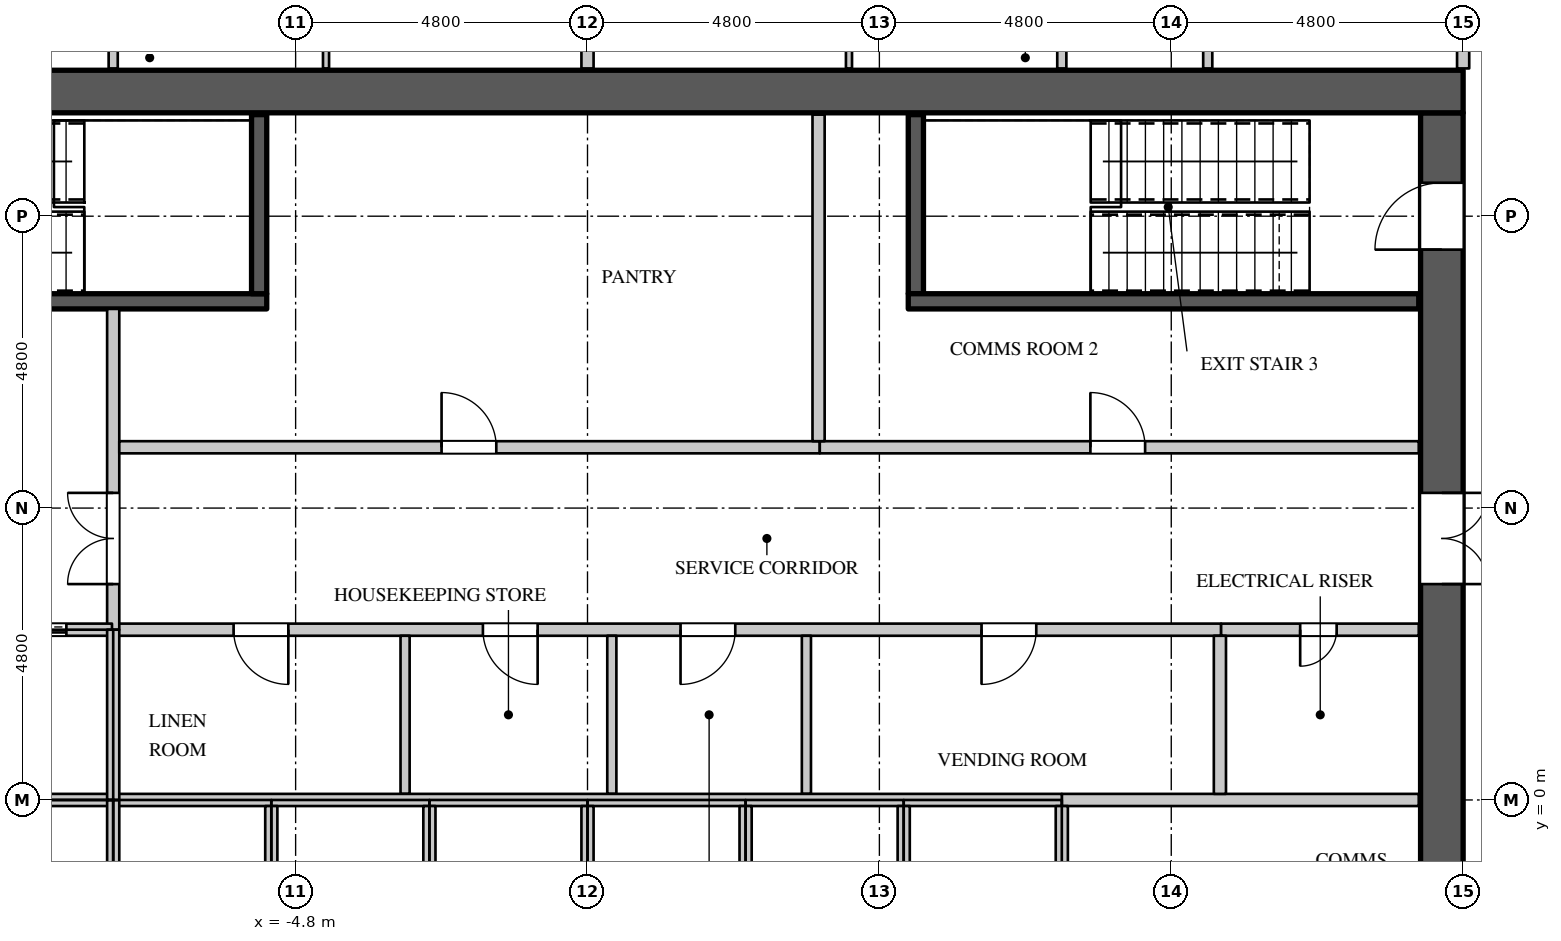
"""IFC4 building model, lengths in metres.
Left out: names, types, materials, properties, quantities, classifications, styles, units other than length and angle.
Written with IfcOpenShell. Run it as: python <this file> out.ifc"""

import sys

from ifc_helpers import new_model, si_unit, direction, frame, frame_2d, origin, place, context, subcontext, project, spatial, rectangle, extrude, element, fill, save


model = new_model("IFC4")
c1 = context("Model", 3, precision=1e-05, world=origin(), true_north=direction((0.0, 1.0)))
c2 = subcontext(c1, "Body", "Model", "MODEL_VIEW")
j1 = project(units=[si_unit("LENGTHUNIT", "METRE"), si_unit("PLANEANGLEUNIT", "RADIAN")], contexts=[c1])
p1 = place(None, origin())
s1 = spatial("IfcSite", under=j1, at=p1, CompositionType="ELEMENT")
p2 = place(p1, origin())
s2 = spatial("IfcBuilding", under=s1, at=p2, CompositionType="ELEMENT")
p3 = place(p2, frame((0.0, 0.0, 174.9)))
s3 = spatial("IfcBuildingStorey", under=s2, at=p3, CompositionType="ELEMENT", Elevation=174.9)
p4 = place(p3, frame((-14.4, 11.65, 0.0), z_axis=(0.0, 0.0, 1.0), x_axis=(1.0, 0.0, 0.0)))
e1 = element("IfcWall", 1, at=p4, inside=s3, PredefinedType="SHEAR", context=c2, shape_type="SweptSolid", body=[
    extrude(rectangle(XDim=28.8, YDim=0.7, at=frame_2d((14.4, 0.0))), origin(), (0.0, 0.0, 1.0), 4.2),
])
p5 = place(p3, frame((14.05, -11.3, 0.0), z_axis=(0.0, 0.0, 1.0), x_axis=(0.0, 1.0, 0.0)))
e2 = element("IfcWall", 2, at=p5, inside=s3, PredefinedType="SHEAR", context=c2, shape_type="SweptSolid", body=[
    extrude(rectangle(XDim=22.6, YDim=0.7, at=frame_2d((11.3, 0.0))), origin(), (0.0, 0.0, 1.0), 4.2),
])
p6 = place(p5, frame((20.35, 0.0, 0.0)))
e3 = element("IfcOpeningElement", 3, at=p6, cuts=e2, PredefinedType="OPENING", context=c2, shape_type="SweptSolid", body=[
    extrude(rectangle(XDim=1.1, YDim=2.2, at=frame_2d((0.55, 1.1))), frame((0.0, 0.36, 0.0), z_axis=(0.0, -1.0, 0.0), x_axis=(1.0, 0.0, 0.0)), (0.0, 0.0, 1.0), 0.72),
])
p7 = place(p5, frame((1.15, 0.0, 0.0)))
e4 = element("IfcOpeningElement", 4, at=p7, cuts=e2, PredefinedType="OPENING", context=c2, shape_type="SweptSolid", body=[
    extrude(rectangle(XDim=1.1, YDim=2.2, at=frame_2d((0.55, 1.1))), frame((0.0, 0.36, 0.0), z_axis=(0.0, -1.0, 0.0), x_axis=(1.0, 0.0, 0.0)), (0.0, 0.0, 1.0), 0.72),
])
p8 = place(p5, frame((14.85, 0.0, 0.0)))
e5 = element("IfcOpeningElement", 5, at=p8, cuts=e2, PredefinedType="OPENING", context=c2, shape_type="SweptSolid", body=[
    extrude(rectangle(XDim=1.5, YDim=2.4, at=frame_2d((0.75, 1.2))), frame((0.0, 0.36, 0.0), z_axis=(0.0, -1.0, 0.0), x_axis=(1.0, 0.0, 0.0)), (0.0, 0.0, 1.0), 0.72),
])
p9 = place(p5, frame((6.25, 0.0, 0.0)))
e6 = element("IfcOpeningElement", 6, at=p9, cuts=e2, PredefinedType="OPENING", context=c2, shape_type="SweptSolid", body=[
    extrude(rectangle(XDim=1.5, YDim=2.4, at=frame_2d((0.75, 1.2))), frame((0.0, 0.36, 0.0), z_axis=(0.0, -1.0, 0.0), x_axis=(1.0, 0.0, 0.0)), (0.0, 0.0, 1.0), 0.72),
])
p10 = place(p3, frame((-7.82, 2.8, 0.0), z_axis=(0.0, 0.0, 1.0), x_axis=(1.0, 0.0, 0.0)))
e7 = element("IfcWall", 7, at=p10, inside=s3, PredefinedType="PARTITIONING", context=c2, shape_type="SweptSolid", body=[
    extrude(rectangle(XDim=18.24, YDim=0.2, at=frame_2d((9.12, 0.0))), origin(), (0.0, 0.0, 1.0), 3.95),
])
p11 = place(p10, frame((2.0, 0.0, 0.0)))
e8 = element("IfcOpeningElement", 8, at=p11, cuts=e7, PredefinedType="OPENING", context=c2, shape_type="SweptSolid", body=[
    extrude(rectangle(XDim=0.9, YDim=2.2, at=frame_2d((0.45, 1.1))), frame((0.0, 0.11, 0.0), z_axis=(0.0, -1.0, 0.0), x_axis=(1.0, 0.0, 0.0)), (0.0, 0.0, 1.0), 0.22),
])
p12 = place(p10, frame((6.1, 0.0, 0.0)))
e9 = element("IfcOpeningElement", 9, at=p12, cuts=e7, PredefinedType="OPENING", context=c2, shape_type="SweptSolid", body=[
    extrude(rectangle(XDim=0.9, YDim=2.2, at=frame_2d((0.45, 1.1))), frame((0.0, 0.11, 0.0), z_axis=(0.0, -1.0, 0.0), x_axis=(1.0, 0.0, 0.0)), (0.0, 0.0, 1.0), 0.22),
])
p13 = place(p10, frame((9.35, 0.0, 0.0)))
e10 = element("IfcOpeningElement", 10, at=p13, cuts=e7, PredefinedType="OPENING", context=c2, shape_type="SweptSolid", body=[
    extrude(rectangle(XDim=0.9, YDim=2.2, at=frame_2d((0.45, 1.1))), frame((0.0, 0.11, 0.0), z_axis=(0.0, -1.0, 0.0), x_axis=(1.0, 0.0, 0.0)), (0.0, 0.0, 1.0), 0.22),
])
p14 = place(p10, frame((14.3, 0.0, 0.0)))
e11 = element("IfcOpeningElement", 11, at=p14, cuts=e7, PredefinedType="OPENING", context=c2, shape_type="SweptSolid", body=[
    extrude(rectangle(XDim=0.9, YDim=2.2, at=frame_2d((0.45, 1.1))), frame((0.0, 0.11, 0.0), z_axis=(0.0, -1.0, 0.0), x_axis=(1.0, 0.0, 0.0)), (0.0, 0.0, 1.0), 0.22),
])
p15 = place(p3, frame((-7.8, 2.8, 0.0), z_axis=(0.0, 0.0, 1.0), x_axis=(0.0, 1.0, 0.0)))
e12 = element("IfcWall", 12, at=p15, inside=s3, PredefinedType="PARTITIONING", context=c2, shape_type="SweptSolid", body=[
    extrude(rectangle(XDim=5.275, YDim=0.2, at=frame_2d((2.637, 0.0))), origin(), (0.0, 0.0, 1.0), 3.95),
])
p16 = place(p15, frame((0.75, 0.0, 0.0)))
e13 = element("IfcOpeningElement", 13, at=p16, cuts=e12, PredefinedType="OPENING", context=c2, shape_type="SweptSolid", body=[
    extrude(rectangle(XDim=1.5, YDim=2.4, at=frame_2d((0.75, 1.2))), frame((0.0, 0.11, 0.0), z_axis=(0.0, -1.0, 0.0), x_axis=(1.0, 0.0, 0.0)), (0.0, 0.0, 1.0), 0.22),
])
p17 = place(p3, frame((-7.7, 5.8, 0.0), z_axis=(0.0, 0.0, 1.0), x_axis=(1.0, 0.0, 0.0)))
e14 = element("IfcWall", 14, at=p17, inside=s3, PredefinedType="PARTITIONING", context=c2, shape_type="SweptSolid", body=[
    extrude(rectangle(XDim=11.52, YDim=0.2, at=frame_2d((5.76, 0.0))), origin(), (0.0, 0.0, 1.0), 3.95),
])
p18 = place(p17, frame((5.3, 0.0, 0.0)))
e15 = element("IfcOpeningElement", 15, at=p18, cuts=e14, PredefinedType="OPENING", context=c2, shape_type="SweptSolid", body=[
    extrude(rectangle(XDim=0.9, YDim=2.2, at=frame_2d((0.45, 1.1))), frame((0.0, 0.11, 0.0), z_axis=(0.0, -1.0, 0.0), x_axis=(1.0, 0.0, 0.0)), (0.0, 0.0, 1.0), 0.22),
])
p19 = place(p3, frame((14.4, 12.03, 0.0), z_axis=(0.0, 0.0, 1.0), x_axis=(0.0, 1.0, 0.0)))
e16 = element("IfcWall", 16, at=p19, inside=s3, PredefinedType="PARTITIONING", context=c2, shape_type="SweptSolid", body=[
    extrude(rectangle(XDim=2.27, YDim=0.2, at=frame_2d((1.135, 0.0))), origin(), (0.0, 0.0, 1.0), 3.95),
])
p20 = place(p19, frame((0.55, 0.0, 0.0)))
e17 = element("IfcOpeningElement", 17, at=p20, cuts=e16, PredefinedType="OPENING", context=c2, shape_type="SweptSolid", body=[
    extrude(rectangle(XDim=1.1, YDim=2.4, at=frame_2d((0.55, 1.2))), frame((0.0, 0.11, 0.0), z_axis=(0.0, -1.0, 0.0), x_axis=(1.0, 0.0, 0.0)), (0.0, 0.0, 1.0), 0.22),
])
p21 = place(p3, frame((-7.8, 12.03, 0.0), z_axis=(0.0, 0.0, 1.0), x_axis=(0.0, 1.0, 0.0)))
e18 = element("IfcWall", 18, at=p21, inside=s3, PredefinedType="PARTITIONING", context=c2, shape_type="SweptSolid", body=[
    extrude(rectangle(XDim=4.695, YDim=0.15, at=frame_2d((2.348, 0.0))), origin(), (0.0, 0.0, 1.0), 3.95),
])
for number, where, z_axis, x_axis in (
    (19, (-3.0, 0.1, 0.0), (0.0, 0.0, 1.0), (0.0, 1.0, 0.0)),
    (20, (0.4, 0.1, 0.0), (0.0, 0.0, 1.0), (0.0, 1.0, 0.0)),
    (21, (3.6, 0.1, 0.0), (0.0, 0.0, 1.0), (0.0, 1.0, 0.0)),
):
    element("IfcWall", number, at=place(p3, frame(where, z_axis=z_axis, x_axis=x_axis)), inside=s3, PredefinedType="PARTITIONING", context=c2, shape_type="SweptSolid", body=[
        extrude(rectangle(XDim=2.6, YDim=0.15, at=frame_2d((1.3, 0.0))), origin(), (0.0, 0.0, 1.0), 3.95),
    ])
p22 = place(p3, frame((7.8, 12.03, 0.0), z_axis=(0.0, 0.0, 1.0), x_axis=(0.0, 1.0, 0.0)))
e22 = element("IfcWall", 22, at=p22, inside=s3, PredefinedType="PARTITIONING", context=c2, shape_type="SweptSolid", body=[
    extrude(rectangle(XDim=4.695, YDim=0.15, at=frame_2d((2.348, 0.0))), origin(), (0.0, 0.0, 1.0), 3.95),
])
p23 = place(p3, frame((10.2, 12.03, 0.0), z_axis=(0.0, 0.0, 1.0), x_axis=(0.0, 1.0, 0.0)))
e23 = element("IfcWall", 23, at=p23, inside=s3, PredefinedType="PARTITIONING", context=c2, shape_type="SweptSolid", body=[
    extrude(rectangle(XDim=4.245, YDim=0.15, at=frame_2d((2.123, 0.0))), origin(), (0.0, 0.0, 1.0), 3.95),
])
p24 = place(p23, frame((1.6, 0.0, 0.0)))
e24 = element("IfcOpeningElement", 24, at=p24, cuts=e23, PredefinedType="OPENING", context=c2, shape_type="SweptSolid", body=[
    extrude(rectangle(XDim=0.95, YDim=2.2, at=frame_2d((0.475, 1.1))), frame((0.0, 0.085, 0.0), z_axis=(0.0, -1.0, 0.0), x_axis=(1.0, 0.0, 0.0)), (0.0, 0.0, 1.0), 0.17),
])
p25 = place(p3, frame((0.0, 12.03, 0.0), z_axis=(0.0, 0.0, 1.0), x_axis=(0.0, 1.0, 0.0)))
e25 = element("IfcWall", 25, at=p25, inside=s3, PredefinedType="PARTITIONING", context=c2, shape_type="SweptSolid", body=[
    extrude(rectangle(XDim=12.025, YDim=0.2, at=frame_2d((6.012, 0.0))), origin(), (0.0, 0.0, 1.0), 3.95),
])
p26 = place(p3, frame((3.82, 5.8, 0.0), z_axis=(0.0, 0.0, 1.0), x_axis=(1.0, 0.0, 0.0)))
e26 = element("IfcWall", 26, at=p26, inside=s3, PredefinedType="PARTITIONING", context=c2, shape_type="SweptSolid", body=[
    extrude(rectangle(XDim=9.85, YDim=0.2, at=frame_2d((4.925, 0.0))), origin(), (0.0, 0.0, 1.0), 3.95),
])
p27 = place(p26, frame((4.45, 0.0, 0.0)))
e27 = element("IfcOpeningElement", 27, at=p27, cuts=e26, PredefinedType="OPENING", context=c2, shape_type="SweptSolid", body=[
    extrude(rectangle(XDim=0.9, YDim=2.2, at=frame_2d((0.45, 1.1))), frame((0.0, 0.11, 0.0), z_axis=(0.0, -1.0, 0.0), x_axis=(1.0, 0.0, 0.0)), (0.0, 0.0, 1.0), 0.22),
])
p28 = place(p3, frame((3.8, 5.9, 0.0), z_axis=(0.0, 0.0, 1.0), x_axis=(0.0, 1.0, 0.0)))
e28 = element("IfcWall", 28, at=p28, inside=s3, PredefinedType="PARTITIONING", context=c2, shape_type="SweptSolid", body=[
    extrude(rectangle(XDim=5.37, YDim=0.2, at=frame_2d((2.685, 0.0))), origin(), (0.0, 0.0, 1.0), 3.95),
])
p29 = place(p3, frame((7.8, 0.0, 0.0), z_axis=(0.0, 0.0, 1.0), x_axis=(1.0, 0.0, 0.0)))
e29 = element("IfcWall", 29, at=p29, inside=s3, PredefinedType="PARTITIONING", context=c2, shape_type="SweptSolid", body=[
    extrude(rectangle(XDim=5.87, YDim=0.2, at=frame_2d((2.935, 0.0))), origin(), (0.0, 0.0, 1.0), 3.95),
])
p30 = place(p3, frame((10.42, 2.8, 0.0), z_axis=(0.0, 0.0, 1.0), x_axis=(1.0, 0.0, 0.0)))
e30 = element("IfcWall", 30, at=p30, inside=s3, PredefinedType="PARTITIONING", context=c2, shape_type="SweptSolid", body=[
    extrude(rectangle(XDim=3.25, YDim=0.2, at=frame_2d((1.625, 0.0))), origin(), (0.0, 0.0, 1.0), 3.95),
])
p31 = place(p30, frame((1.3, 0.0, 0.0)))
e31 = element("IfcOpeningElement", 31, at=p31, cuts=e30, PredefinedType="OPENING", context=c2, shape_type="SweptSolid", body=[
    extrude(rectangle(XDim=0.6, YDim=2.0, at=frame_2d((0.3, 1.0))), frame((0.0, 0.11, 0.0), z_axis=(0.0, -1.0, 0.0), x_axis=(1.0, 0.0, 0.0)), (0.0, 0.0, 1.0), 0.22),
])
p32 = place(p3, frame((10.4, 0.1, 0.0), z_axis=(0.0, 0.0, 1.0), x_axis=(0.0, 1.0, 0.0)))
e32 = element("IfcWall", 32, at=p32, inside=s3, PredefinedType="PARTITIONING", context=c2, shape_type="SweptSolid", body=[
    extrude(rectangle(XDim=2.6, YDim=0.2, at=frame_2d((1.3, 0.0))), origin(), (0.0, 0.0, 1.0), 3.95),
])
p33 = place(p3, frame((-13.67, 0.0, 0.0), z_axis=(0.0, 0.0, 1.0), x_axis=(1.0, 0.0, 0.0)))
e33 = element("IfcWall", 33, at=p33, inside=s3, PredefinedType="PARTITIONING", context=c2, shape_type="SweptSolid", body=[
    extrude(rectangle(XDim=21.47, YDim=0.2, at=frame_2d((10.735, 0.0))), origin(), (0.0, 0.0, 1.0), 3.95),
])
p34 = place(p3, frame((-13.67, 2.8, 0.0), z_axis=(0.0, 0.0, 1.0), x_axis=(1.0, 0.0, 0.0)))
e34 = element("IfcWall", 34, at=p34, inside=s3, PredefinedType="PARTITIONING", context=c2, shape_type="SweptSolid", body=[
    extrude(rectangle(XDim=5.85, YDim=0.2, at=frame_2d((2.925, 0.0))), origin(), (0.0, 0.0, 1.0), 3.95),
])
p35 = place(p34, frame((1.05, 0.0, 0.0)))
e35 = element("IfcOpeningElement", 35, at=p35, cuts=e34, PredefinedType="OPENING", context=c2, shape_type="SweptSolid", body=[
    extrude(rectangle(XDim=1.1, YDim=2.2, at=frame_2d((0.55, 1.1))), frame((0.0, 0.11, 0.0), z_axis=(0.0, -1.0, 0.0), x_axis=(1.0, 0.0, 0.0)), (0.0, 0.0, 1.0), 0.22),
])
p36 = place(p34, frame((4.0, 0.0, 0.0)))
e36 = element("IfcOpeningElement", 36, at=p36, cuts=e34, PredefinedType="OPENING", context=c2, shape_type="SweptSolid", body=[
    extrude(rectangle(XDim=1.1, YDim=2.2, at=frame_2d((0.55, 1.1))), frame((0.0, 0.11, 0.0), z_axis=(0.0, -1.0, 0.0), x_axis=(1.0, 0.0, 0.0)), (0.0, 0.0, 1.0), 0.22),
])
for number, where, z_axis, x_axis in (
    (37, (-7.8, -2.8, 0.0), (0.0, 0.0, 1.0), (0.0, 1.0, 0.0)),
    (38, (-7.8, 0.0, 0.0), (0.0, 0.0, 1.0), (0.0, 1.0, 0.0)),
):
    element("IfcWall", number, at=place(p3, frame(where, z_axis=z_axis, x_axis=x_axis)), inside=s3, PredefinedType="PARTITIONING", context=c2, shape_type="SweptSolid", body=[
        extrude(rectangle(XDim=2.8, YDim=0.2, at=frame_2d((1.4, 0.0))), origin(), (0.0, 0.0, 1.0), 3.95),
    ])
for number, where, z_axis, x_axis in (
    (39, (-5.2, -2.7, 0.0), (0.0, 0.0, 1.0), (0.0, 1.0, 0.0)),
    (40, (-2.6, -2.7, 0.0), (0.0, 0.0, 1.0), (0.0, 1.0, 0.0)),
    (41, (0.0, -2.7, 0.0), (0.0, 0.0, 1.0), (0.0, 1.0, 0.0)),
    (42, (2.6, -2.7, 0.0), (0.0, 0.0, 1.0), (0.0, 1.0, 0.0)),
    (43, (5.2, -2.7, 0.0), (0.0, 0.0, 1.0), (0.0, 1.0, 0.0)),
    (44, (7.8, -2.7, 0.0), (0.0, 0.0, 1.0), (0.0, 1.0, 0.0)),
):
    element("IfcWall", number, at=place(p3, frame(where, z_axis=z_axis, x_axis=x_axis)), inside=s3, PredefinedType="PARTITIONING", context=c2, shape_type="SweptSolid", body=[
        extrude(rectangle(XDim=2.6, YDim=0.2, at=frame_2d((1.3, 0.0))), origin(), (0.0, 0.0, 1.0), 3.95),
    ])
p37 = place(p3, frame((-13.67, 8.2, 0.0), z_axis=(0.0, 0.0, 1.0), x_axis=(1.0, 0.0, 0.0)))
e45 = element("IfcWall", 45, at=p37, inside=s3, PredefinedType="SHEAR", context=c2, shape_type="SweptSolid", body=[
    extrude(rectangle(XDim=8.395, YDim=0.25, at=frame_2d((4.198, 0.0))), origin(), (0.0, 0.0, 1.0), 3.95),
])
p38 = place(p37, frame((0.15, 0.0, 0.0)))
e46 = element("IfcOpeningElement", 46, at=p38, cuts=e45, PredefinedType="OPENING", context=c2, shape_type="SweptSolid", body=[
    extrude(rectangle(XDim=1.1, YDim=2.2, at=frame_2d((0.55, 1.1))), frame((0.0, 0.135, 0.0), z_axis=(0.0, -1.0, 0.0), x_axis=(1.0, 0.0, 0.0)), (0.0, 0.0, 1.0), 0.27),
])
for number, where, z_axis, x_axis in (
    (47, (-5.4, 8.325, 0.0), (0.0, 0.0, 1.0), (0.0, 1.0, 0.0)),
    (48, (5.4, 8.325, 0.0), (0.0, 0.0, 1.0), (0.0, 1.0, 0.0)),
):
    element("IfcWall", number, at=place(p3, frame(where, z_axis=z_axis, x_axis=x_axis)), inside=s3, PredefinedType="SHEAR", context=c2, shape_type="SweptSolid", body=[
        extrude(rectangle(XDim=2.945, YDim=0.25, at=frame_2d((1.473, 0.0))), origin(), (0.0, 0.0, 1.0), 3.95),
    ])
p39 = place(p3, frame((5.275, 8.2, 0.0), z_axis=(0.0, 0.0, 1.0), x_axis=(1.0, 0.0, 0.0)))
e49 = element("IfcWall", 49, at=p39, inside=s3, PredefinedType="SHEAR", context=c2, shape_type="SweptSolid", body=[
    extrude(rectangle(XDim=8.395, YDim=0.25, at=frame_2d((4.198, 0.0))), origin(), (0.0, 0.0, 1.0), 3.95),
])
for number, where, z_axis, x_axis in (
    (50, (-4.3, 12.03, 0.0), (0.0, 0.0, 1.0), (0.0, 1.0, 0.0)),
    (51, (4.3, 12.03, 0.0), (0.0, 0.0, 1.0), (0.0, 1.0, 0.0)),
):
    element("IfcWall", number, at=place(p3, frame(where, z_axis=z_axis, x_axis=x_axis)), inside=s3, PredefinedType="PARTITIONING", context=c2, shape_type="SweptSolid", body=[
        extrude(rectangle(XDim=4.695, YDim=0.1, at=frame_2d((2.348, 0.0))), origin(), (0.0, 0.0, 1.0), 3.35),
    ])
p40 = place(p31, origin())
e52 = element("IfcDoor", 52, at=p40, inside=s3, OperationType="SINGLE_SWING_RIGHT", PredefinedType="DOOR", context=c2, shape_type="SweptSolid", body=[
    extrude(rectangle(XDim=0.6, YDim=2.0, at=frame_2d((0.3, 1.0))), frame((0.0, 0.025, 0.0), z_axis=(0.0, -1.0, 0.0), x_axis=(1.0, 0.0, 0.0)), (0.0, 0.0, 1.0), 0.05),
])
fill(e31, e52)
p41 = place(p18, origin())
e53 = element("IfcDoor", 53, at=p41, inside=s3, OperationType="SINGLE_SWING_LEFT", PredefinedType="DOOR", context=c2, shape_type="SweptSolid", body=[
    extrude(rectangle(XDim=0.9, YDim=2.2, at=frame_2d((0.45, 1.1))), frame((0.0, 0.025, 0.0), z_axis=(0.0, -1.0, 0.0), x_axis=(1.0, 0.0, 0.0)), (0.0, 0.0, 1.0), 0.05),
])
fill(e15, e53)
p42 = place(p27, origin())
e54 = element("IfcDoor", 54, at=p42, inside=s3, OperationType="SINGLE_SWING_LEFT", PredefinedType="DOOR", context=c2, shape_type="SweptSolid", body=[
    extrude(rectangle(XDim=0.9, YDim=2.2, at=frame_2d((0.45, 1.1))), frame((0.0, 0.025, 0.0), z_axis=(0.0, -1.0, 0.0), x_axis=(1.0, 0.0, 0.0)), (0.0, 0.0, 1.0), 0.05),
])
fill(e27, e54)
p43 = place(p11, origin())
e55 = element("IfcDoor", 55, at=p43, inside=s3, OperationType="SINGLE_SWING_LEFT", PredefinedType="DOOR", context=c2, shape_type="SweptSolid", body=[
    extrude(rectangle(XDim=0.9, YDim=2.2, at=frame_2d((0.45, 1.1))), frame((0.0, 0.025, 0.0), z_axis=(0.0, -1.0, 0.0), x_axis=(1.0, 0.0, 0.0)), (0.0, 0.0, 1.0), 0.05),
])
fill(e8, e55)
p44 = place(p12, origin())
e56 = element("IfcDoor", 56, at=p44, inside=s3, OperationType="SINGLE_SWING_LEFT", PredefinedType="DOOR", context=c2, shape_type="SweptSolid", body=[
    extrude(rectangle(XDim=0.9, YDim=2.2, at=frame_2d((0.45, 1.1))), frame((0.0, 0.025, 0.0), z_axis=(0.0, -1.0, 0.0), x_axis=(1.0, 0.0, 0.0)), (0.0, 0.0, 1.0), 0.05),
])
fill(e9, e56)
p45 = place(p13, origin())
e57 = element("IfcDoor", 57, at=p45, inside=s3, OperationType="SINGLE_SWING_RIGHT", PredefinedType="DOOR", context=c2, shape_type="SweptSolid", body=[
    extrude(rectangle(XDim=0.9, YDim=2.2, at=frame_2d((0.45, 1.1))), frame((0.0, 0.025, 0.0), z_axis=(0.0, -1.0, 0.0), x_axis=(1.0, 0.0, 0.0)), (0.0, 0.0, 1.0), 0.05),
])
fill(e10, e57)
p46 = place(p14, origin())
e58 = element("IfcDoor", 58, at=p46, inside=s3, OperationType="SINGLE_SWING_RIGHT", PredefinedType="DOOR", context=c2, shape_type="SweptSolid", body=[
    extrude(rectangle(XDim=0.9, YDim=2.2, at=frame_2d((0.45, 1.1))), frame((0.0, 0.025, 0.0), z_axis=(0.0, -1.0, 0.0), x_axis=(1.0, 0.0, 0.0)), (0.0, 0.0, 1.0), 0.05),
])
fill(e11, e58)
p47 = place(p36, origin())
e59 = element("IfcDoor", 59, at=p47, inside=s3, OperationType="DOUBLE_DOOR_SLIDING", PredefinedType="DOOR", context=c2, shape_type="SweptSolid", body=[
    extrude(rectangle(XDim=1.1, YDim=2.2, at=frame_2d((0.55, 1.1))), frame((0.0, 0.025, 0.0), z_axis=(0.0, -1.0, 0.0), x_axis=(1.0, 0.0, 0.0)), (0.0, 0.0, 1.0), 0.05),
])
fill(e36, e59)
p48 = place(p16, origin())
e60 = element("IfcDoor", 60, at=p48, inside=s3, OperationType="DOUBLE_DOOR_SINGLE_SWING", PredefinedType="DOOR", context=c2, shape_type="SweptSolid", body=[
    extrude(rectangle(XDim=1.5, YDim=2.4, at=frame_2d((0.75, 1.2))), frame((0.0, 0.025, 0.0), z_axis=(0.0, -1.0, 0.0), x_axis=(1.0, 0.0, 0.0)), (0.0, 0.0, 1.0), 0.05),
])
fill(e13, e60)
p49 = place(p6, origin())
e61 = element("IfcDoor", 61, at=p49, inside=s3, OperationType="SINGLE_SWING_LEFT", PredefinedType="DOOR", context=c2, shape_type="SweptSolid", body=[
    extrude(rectangle(XDim=1.1, YDim=2.2, at=frame_2d((0.55, 1.1))), frame((0.0, 0.345, 0.0), z_axis=(0.0, -1.0, 0.0), x_axis=(1.0, 0.0, 0.0)), (0.0, 0.0, 1.0), 0.05),
])
fill(e3, e61)
p50 = place(p8, origin())
e62 = element("IfcDoor", 62, at=p50, inside=s3, OperationType="DOUBLE_DOOR_SINGLE_SWING", PredefinedType="DOOR", context=c2, shape_type="SweptSolid", body=[
    extrude(rectangle(XDim=1.5, YDim=2.4, at=frame_2d((0.75, 1.2))), frame((0.0, -0.295, 0.0), z_axis=(0.0, -1.0, 0.0), x_axis=(1.0, 0.0, 0.0)), (0.0, 0.0, 1.0), 0.05),
])
fill(e5, e62)
save(model, sys.argv[1])
